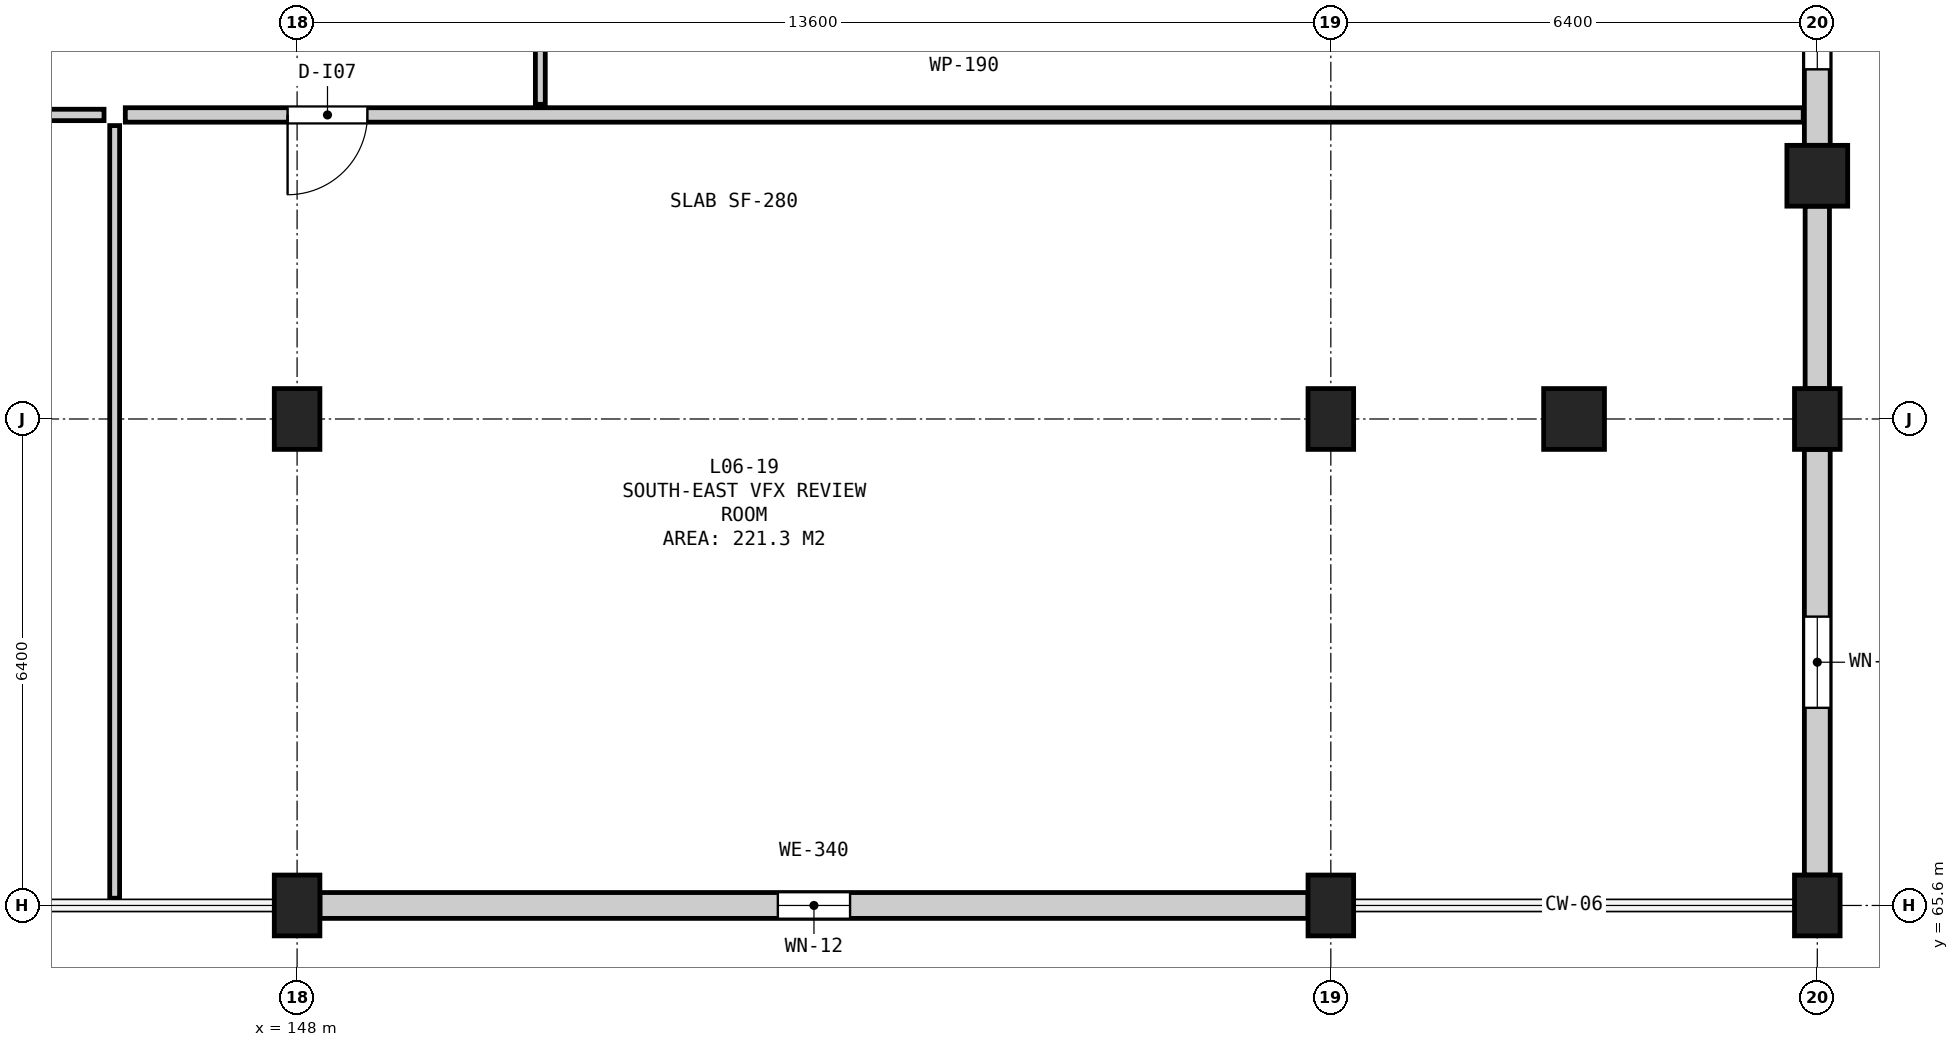
"""IFC4 building model, lengths in metres.
Left out: names, types, materials, properties, quantities, classifications, styles, units other than length and angle.
Written with IfcOpenShell. Run it as: python <this file> out.ifc"""

import sys

from ifc_helpers import new_model, si_unit, direction, frame, frame_2d, origin, origin_2d, place, context, subcontext, project, spatial, rectangle, circle, extrude, element, fill, save


model = new_model("IFC4")
c1 = context("Model", 3, precision=1e-05, world=origin(), true_north=direction((0.0, 1.0)))
c2 = subcontext(c1, "Body", "Model", "MODEL_VIEW")
j1 = project(units=[si_unit("LENGTHUNIT", "METRE"), si_unit("PLANEANGLEUNIT", "RADIAN")], contexts=[c1])
p1 = place(None, origin())
s1 = spatial("IfcSite", under=j1, at=p1, CompositionType="ELEMENT")
p2 = place(p1, origin())
s2 = spatial("IfcBuilding", under=s1, at=p2, CompositionType="ELEMENT")
p3 = place(p2, frame((0.0, 0.0, 27.8)))
s3 = spatial("IfcBuildingStorey", under=s2, at=p3, CompositionType="ELEMENT", Elevation=27.8)
for number, where, z_axis, x_axis in (
    (1, (148.0, 65.6, 0.0), (0.0, 0.0, 1.0), (1.0, 0.0, 0.0)),
    (2, (148.0, 72.0, 0.0), (0.0, 0.0, 1.0), (1.0, 0.0, 0.0)),
    (3, (161.6, 65.6, 0.0), (0.0, 0.0, 1.0), (1.0, 0.0, 0.0)),
    (4, (161.6, 72.0, 0.0), (0.0, 0.0, 1.0), (1.0, 0.0, 0.0)),
):
    element("IfcColumn", number, at=place(p3, frame(where, z_axis=z_axis, x_axis=x_axis)), inside=s3, PredefinedType="COLUMN", context=c2, shape_type="SweptSolid", body=[
        extrude(rectangle(XDim=0.6, YDim=0.8, at=origin_2d()), origin(), (0.0, 0.0, 1.0), 3.9),
    ])
p4 = place(p3, frame((164.8, 72.0, 0.0), z_axis=(0.0, 0.0, 1.0), x_axis=(1.0, 0.0, 0.0)))
e5 = element("IfcColumn", 5, at=p4, inside=s3, PredefinedType="COLUMN", context=c2, shape_type="SweptSolid", body=[
    extrude(circle(Radius=0.4, at=origin_2d()), origin(), (0.0, 0.0, 1.0), 3.9),
])
for number, where, z_axis, x_axis in (
    (6, (168.0, 65.6, 0.0), (0.0, 0.0, 1.0), (1.0, 0.0, 0.0)),
    (7, (168.0, 72.0, 0.0), (0.0, 0.0, 1.0), (1.0, 0.0, 0.0)),
):
    element("IfcColumn", number, at=place(p3, frame(where, z_axis=z_axis, x_axis=x_axis)), inside=s3, PredefinedType="COLUMN", context=c2, shape_type="SweptSolid", body=[
        extrude(rectangle(XDim=0.6, YDim=0.8, at=origin_2d()), origin(), (0.0, 0.0, 1.0), 3.9),
    ])
p5 = place(p3, frame((168.0, 75.2, 0.0), z_axis=(0.0, 0.0, 1.0), x_axis=(1.0, 0.0, 0.0)))
e8 = element("IfcColumn", 8, at=p5, inside=s3, PredefinedType="COLUMN", context=c2, shape_type="SweptSolid", body=[
    extrude(circle(Radius=0.4, at=origin_2d()), origin(), (0.0, 0.0, 1.0), 3.9),
])
p6 = place(p3, frame((148.3, 65.6, 0.0), z_axis=(0.0, 0.0, 1.0), x_axis=(1.0, 0.0, 0.0)))
e9 = element("IfcWall", 9, at=p6, inside=s3, PredefinedType="SOLIDWALL", context=c2, shape_type="SweptSolid", body=[
    extrude(rectangle(XDim=13.0, YDim=0.34, at=frame_2d((6.5, 0.0))), origin(), (0.0, 0.0, 1.0), 2.625),
])
p7 = place(p6, frame((6.025, 0.0, 0.8)))
e10 = element("IfcOpeningElement", 10, at=p7, cuts=e9, PredefinedType="OPENING", context=c2, shape_type="SweptSolid", body=[
    extrude(rectangle(XDim=0.95, YDim=1.45, at=frame_2d((0.475, 0.725))), frame((0.0, 0.182, 0.0), z_axis=(0.0, -1.0, 0.0), x_axis=(1.0, 0.0, 0.0)), (0.0, 0.0, 1.0), 0.364),
])
p8 = place(p3, frame((168.0, 66.0, 0.0), z_axis=(0.0, 0.0, 1.0), x_axis=(0.0, 1.0, 0.0)))
e11 = element("IfcWall", 11, at=p8, inside=s3, PredefinedType="SOLIDWALL", context=c2, shape_type="SweptSolid", body=[
    extrude(rectangle(XDim=5.6, YDim=0.34, at=frame_2d((2.8, 0.0))), origin(), (0.0, 0.0, 1.0), 3.04),
])
p9 = place(p8, frame((2.2, 0.0, 0.9)))
e12 = element("IfcOpeningElement", 12, at=p9, cuts=e11, PredefinedType="OPENING", context=c2, shape_type="SweptSolid", body=[
    extrude(rectangle(XDim=1.2, YDim=1.7, at=frame_2d((0.6, 0.85))), frame((0.0, 0.182, 0.0), z_axis=(0.0, -1.0, 0.0), x_axis=(1.0, 0.0, 0.0)), (0.0, 0.0, 1.0), 0.364),
])
p10 = place(p3, frame((168.0, 72.4, 0.0), z_axis=(0.0, 0.0, 1.0), x_axis=(0.0, 1.0, 0.0)))
e13 = element("IfcWall", 13, at=p10, inside=s3, PredefinedType="SOLIDWALL", context=c2, shape_type="SweptSolid", body=[
    extrude(rectangle(XDim=2.4, YDim=0.32, at=frame_2d((1.2, 0.0))), origin(), (0.0, 0.0, 1.0), 3.04),
])
p11 = place(p3, frame((168.0, 75.6, 0.0), z_axis=(0.0, 0.0, 1.0), x_axis=(0.0, 1.0, 0.0)))
e14 = element("IfcWall", 14, at=p11, inside=s3, PredefinedType="SOLIDWALL", context=c2, shape_type="SweptSolid", body=[
    extrude(rectangle(XDim=3.2, YDim=0.34, at=frame_2d((1.6, 0.0))), origin(), (0.0, 0.0, 1.0), 3.04),
])
p12 = place(p11, frame((1.0, 0.0, 0.9)))
e15 = element("IfcOpeningElement", 15, at=p12, cuts=e14, PredefinedType="OPENING", context=c2, shape_type="SweptSolid", body=[
    extrude(rectangle(XDim=1.2, YDim=1.7, at=frame_2d((0.6, 0.85))), frame((0.0, 0.182, 0.0), z_axis=(0.0, -1.0, 0.0), x_axis=(1.0, 0.0, 0.0)), (0.0, 0.0, 1.0), 0.364),
])
p13 = place(p3, frame((132.14, 76.0, 0.0), z_axis=(0.0, 0.0, 1.0), x_axis=(1.0, 0.0, 0.0)))
e16 = element("IfcWall", 16, at=p13, inside=s3, PredefinedType="PARTITIONING", context=c2, shape_type="SweptSolid", body=[
    extrude(rectangle(XDim=13.32, YDim=0.15, at=frame_2d((6.66, 0.0))), origin(), (0.0, 0.0, 1.0), 3.62),
])
p14 = place(p13, frame((6.135, 0.0, 0.0)))
e17 = element("IfcOpeningElement", 17, at=p14, cuts=e16, PredefinedType="OPENING", context=c2, shape_type="SweptSolid", body=[
    extrude(rectangle(XDim=1.05, YDim=2.15, at=frame_2d((0.525, 1.075))), frame((0.0, 0.087, 0.0), z_axis=(0.0, -1.0, 0.0), x_axis=(1.0, 0.0, 0.0)), (0.0, 0.0, 1.0), 0.174),
])
p15 = place(p3, frame((145.6, 65.695, 0.0), z_axis=(0.0, 0.0, 1.0), x_axis=(0.0, 1.0, 0.0)))
e18 = element("IfcWall", 18, at=p15, inside=s3, PredefinedType="PARTITIONING", context=c2, shape_type="SweptSolid", body=[
    extrude(rectangle(XDim=10.165, YDim=0.13, at=frame_2d((5.083, 0.0))), origin(), (0.0, 0.0, 1.0), 3.62),
])
p16 = place(p3, frame((145.74, 76.0, 0.0), z_axis=(0.0, 0.0, 1.0), x_axis=(1.0, 0.0, 0.0)))
e19 = element("IfcWall", 19, at=p16, inside=s3, PredefinedType="PARTITIONING", context=c2, shape_type="SweptSolid", body=[
    extrude(rectangle(XDim=22.075, YDim=0.19, at=frame_2d((11.038, 0.0))), origin(), (0.0, 0.0, 1.0), 3.62),
])
p17 = place(p16, frame((2.135, 0.0, 0.0)))
e20 = element("IfcOpeningElement", 20, at=p17, cuts=e19, PredefinedType="OPENING", context=c2, shape_type="SweptSolid", body=[
    extrude(rectangle(XDim=1.05, YDim=2.15, at=frame_2d((0.525, 1.075))), frame((0.0, 0.107, 0.0), z_axis=(0.0, -1.0, 0.0), x_axis=(1.0, 0.0, 0.0)), (0.0, 0.0, 1.0), 0.214),
])
p18 = place(p3, frame((151.2, 76.14, 0.0), z_axis=(0.0, 0.0, 1.0), x_axis=(0.0, 1.0, 0.0)))
e21 = element("IfcWall", 21, at=p18, inside=s3, PredefinedType="PARTITIONING", context=c2, shape_type="SweptSolid", body=[
    extrude(rectangle(XDim=22.12, YDim=0.13, at=frame_2d((11.06, 0.0))), origin(), (0.0, 0.0, 1.0), 3.62),
])
p19 = place(p18, frame((10.535, 0.0, 0.0)))
e22 = element("IfcOpeningElement", 22, at=p19, cuts=e21, PredefinedType="OPENING", context=c2, shape_type="SweptSolid", body=[
    extrude(rectangle(XDim=1.05, YDim=2.15, at=frame_2d((0.525, 1.075))), frame((0.0, 0.077, 0.0), z_axis=(0.0, -1.0, 0.0), x_axis=(1.0, 0.0, 0.0)), (0.0, 0.0, 1.0), 0.154),
])
p20 = place(p7, origin())
e23 = element("IfcWindow", 23, at=p20, inside=s3, PartitioningType="SINGLE_PANEL", PredefinedType="WINDOW", context=c2, shape_type="SweptSolid", body=[
    extrude(rectangle(XDim=0.95, YDim=1.45, at=frame_2d((0.475, 0.725))), frame((0.0, 0.03, 0.0), z_axis=(0.0, -1.0, 0.0), x_axis=(1.0, 0.0, 0.0)), (0.0, 0.0, 1.0), 0.06),
])
fill(e10, e23)
p21 = place(p9, origin())
e24 = element("IfcWindow", 24, at=p21, inside=s3, PartitioningType="SINGLE_PANEL", PredefinedType="WINDOW", context=c2, shape_type="SweptSolid", body=[
    extrude(rectangle(XDim=1.2, YDim=1.7, at=frame_2d((0.6, 0.85))), frame((0.0, 0.03, 0.0), z_axis=(0.0, -1.0, 0.0), x_axis=(1.0, 0.0, 0.0)), (0.0, 0.0, 1.0), 0.06),
])
fill(e12, e24)
p22 = place(p12, origin())
e25 = element("IfcWindow", 25, at=p22, inside=s3, PartitioningType="SINGLE_PANEL", PredefinedType="WINDOW", context=c2, shape_type="SweptSolid", body=[
    extrude(rectangle(XDim=1.2, YDim=1.7, at=frame_2d((0.6, 0.85))), frame((0.0, 0.03, 0.0), z_axis=(0.0, -1.0, 0.0), x_axis=(1.0, 0.0, 0.0)), (0.0, 0.0, 1.0), 0.06),
])
fill(e15, e25)
p23 = place(p17, frame((1.05, 0.0, 0.0), z_axis=(0.0, 0.0, 1.0), x_axis=(-1.0, 0.0, 0.0)))
e26 = element("IfcDoor", 26, at=p23, inside=s3, OperationType="SINGLE_SWING_RIGHT", PredefinedType="DOOR", context=c2, shape_type="SweptSolid", body=[
    extrude(rectangle(XDim=1.05, YDim=2.15, at=frame_2d((0.525, 1.075))), frame((0.0, 0.025, 0.0), z_axis=(0.0, -1.0, 0.0), x_axis=(1.0, 0.0, 0.0)), (0.0, 0.0, 1.0), 0.05),
])
fill(e20, e26)
save(model, sys.argv[1])
